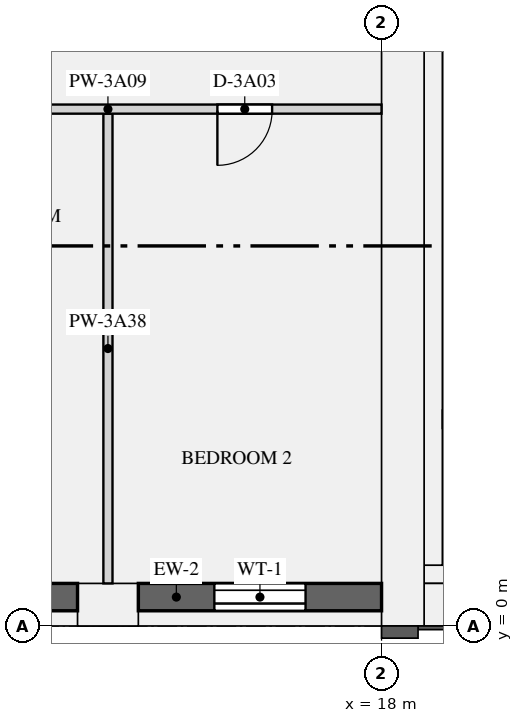
"""IFC4 building model, lengths in metres.
Left out: names, types, materials, properties, quantities, classifications, styles, units other than length and angle.
Written with IfcOpenShell. Run it as: python <this file> out.ifc"""

import sys

from ifc_helpers import new_model, si_unit, direction, frame, frame_2d, origin, origin_2d, place, context, subcontext, project, spatial, rectangle, extrude, element, fill, save


model = new_model("IFC4")
c1 = context("Model", 3, precision=1e-05, world=origin(), true_north=direction((0.0, 1.0)))
c2 = subcontext(c1, "Body", "Model", "MODEL_VIEW")
j1 = project(units=[si_unit("LENGTHUNIT", "METRE"), si_unit("PLANEANGLEUNIT", "RADIAN")], contexts=[c1])
p1 = place(None, origin())
s1 = spatial("IfcSite", under=j1, at=p1, CompositionType="ELEMENT")
p2 = place(p1, origin())
s2 = spatial("IfcBuilding", under=s1, at=p2, CompositionType="ELEMENT")
p3 = place(p2, frame((0.0, 0.0, 141.3)))
s3 = spatial("IfcBuildingStorey", under=s2, at=p3, CompositionType="ELEMENT", Elevation=141.3)
p4 = place(p3, frame((13.5, 0.35, 0.0), z_axis=(0.0, 0.0, 1.0), x_axis=(1.0, 0.0, 0.0)))
e1 = element("IfcColumn", 1, at=p4, inside=s3, PredefinedType="USERDEFINED", context=c2, shape_type="SweptSolid", body=[
    extrude(rectangle(XDim=1.0, YDim=0.7, at=origin_2d()), origin(), (0.0, 0.0, 1.0), 3.15),
])
p5 = place(p3, frame((18.35, 0.0, 0.0), z_axis=(0.0, 0.0, 1.0), x_axis=(0.0, 1.0, 0.0)))
e2 = element("IfcWall", 2, at=p5, inside=s3, PredefinedType="SHEAR", context=c2, shape_type="SweptSolid", body=[
    extrude(rectangle(XDim=12.5, YDim=0.7, at=frame_2d((6.25, 0.0))), origin(), (0.0, 0.0, 1.0), 3.15),
])
p6 = place(p3, frame((18.7, 0.35, 0.0), z_axis=(0.0, 0.0, 1.0), x_axis=(1.0, 0.0, 0.0)))
e3 = element("IfcWall", 3, at=p6, inside=s3, PredefinedType="SHEAR", context=c2, shape_type="SweptSolid", body=[
    extrude(rectangle(XDim=34.6, YDim=0.7, at=frame_2d((17.3, 0.0))), origin(), (0.0, 0.0, 1.0), 3.15),
])
p7 = place(p3, frame((18.85, 1.0, 0.0), z_axis=(0.0, 0.0, 1.0), x_axis=(0.0, 1.0, 0.0)))
e4 = element("IfcWall", 4, at=p7, inside=s3, PredefinedType="SHEAR", context=c2, shape_type="SweptSolid", body=[
    extrude(rectangle(XDim=10.9, YDim=0.3, at=frame_2d((5.45, 0.0))), origin(), (0.0, 0.0, 1.0), 3.15),
])
p8 = place(p3, frame((18.7, 0.85, 0.0), z_axis=(0.0, 0.0, 1.0), x_axis=(1.0, 0.0, 0.0)))
e5 = element("IfcWall", 5, at=p8, inside=s3, PredefinedType="SHEAR", context=c2, shape_type="SweptSolid", body=[
    extrude(rectangle(XDim=34.6, YDim=0.3, at=frame_2d((17.3, 0.0))), origin(), (0.0, 0.0, 1.0), 3.15),
])
p9 = place(p3, frame((19.0, 3.4, 0.0), z_axis=(0.0, 0.0, 1.0), x_axis=(1.0, 0.0, 0.0)))
e6 = element("IfcWall", 6, at=p9, inside=s3, PredefinedType="SHEAR", context=c2, shape_type="SweptSolid", body=[
    extrude(rectangle(XDim=2.55, YDim=0.3, at=frame_2d((1.275, 0.0))), origin(), (0.0, 0.0, 1.0), 3.15),
])
p10 = place(p9, frame((0.675, 0.0, 0.0)))
e7 = element("IfcOpeningElement", 7, at=p10, cuts=e6, PredefinedType="OPENING", context=c2, shape_type="SweptSolid", body=[
    extrude(rectangle(XDim=1.2, YDim=2.1, at=frame_2d((0.6, 1.05))), frame((0.0, 0.16, 0.0), z_axis=(0.0, -1.0, 0.0), x_axis=(1.0, 0.0, 0.0)), (0.0, 0.0, 1.0), 0.32),
])
p11 = place(p3, frame((10.0, 0.475, 0.9), z_axis=(0.0, 0.0, 1.0), x_axis=(1.0, 0.0, 0.0)))
e8 = element("IfcWall", 8, at=p11, inside=s3, PredefinedType="SOLIDWALL", context=c2, shape_type="SweptSolid", body=[
    extrude(rectangle(XDim=3.0, YDim=0.45, at=frame_2d((1.5, 0.0))), origin(), (0.0, 0.0, 1.0), 1.93),
])
p12 = place(p11, frame((0.75, 0.0, 0.15)))
e9 = element("IfcOpeningElement", 9, at=p12, cuts=e8, PredefinedType="OPENING", context=c2, shape_type="SweptSolid", body=[
    extrude(rectangle(XDim=1.5, YDim=1.5, at=frame_2d((0.75, 0.75))), frame((0.0, 0.235, 0.0), z_axis=(0.0, -1.0, 0.0), x_axis=(1.0, 0.0, 0.0)), (0.0, 0.0, 1.0), 0.47),
])
p13 = place(p3, frame((14.0, 0.475, 0.9), z_axis=(0.0, 0.0, 1.0), x_axis=(1.0, 0.0, 0.0)))
e10 = element("IfcWall", 10, at=p13, inside=s3, PredefinedType="SOLIDWALL", context=c2, shape_type="SweptSolid", body=[
    extrude(rectangle(XDim=4.0, YDim=0.45, at=frame_2d((2.0, 0.0))), origin(), (0.0, 0.0, 1.0), 1.93),
])
p14 = place(p13, frame((1.25, 0.0, 0.15)))
e11 = element("IfcOpeningElement", 11, at=p14, cuts=e10, PredefinedType="OPENING", context=c2, shape_type="SweptSolid", body=[
    extrude(rectangle(XDim=1.5, YDim=1.5, at=frame_2d((0.75, 0.75))), frame((0.0, 0.235, 0.0), z_axis=(0.0, -1.0, 0.0), x_axis=(1.0, 0.0, 0.0)), (0.0, 0.0, 1.0), 0.47),
])
p15 = place(p3, frame((5.2, 8.5, 0.0), z_axis=(0.0, 0.0, 1.0), x_axis=(1.0, 0.0, 0.0)))
e12 = element("IfcWall", 12, at=p15, inside=s3, PredefinedType="PARTITIONING", context=c2, shape_type="SweptSolid", body=[
    extrude(rectangle(XDim=12.8, YDim=0.15, at=frame_2d((6.4, 0.0))), origin(), (0.0, 0.0, 1.0), 2.83),
])
p16 = place(p15, frame((10.1, 0.0, 0.0)))
e13 = element("IfcOpeningElement", 13, at=p16, cuts=e12, PredefinedType="OPENING", context=c2, shape_type="SweptSolid", body=[
    extrude(rectangle(XDim=0.9, YDim=2.1, at=frame_2d((0.45, 1.05))), frame((0.0, 0.085, 0.0), z_axis=(0.0, -1.0, 0.0), x_axis=(1.0, 0.0, 0.0)), (0.0, 0.0, 1.0), 0.17),
])
p17 = place(p15, frame((5.6, 0.0, 0.0)))
e14 = element("IfcOpeningElement", 14, at=p17, cuts=e12, PredefinedType="OPENING", context=c2, shape_type="SweptSolid", body=[
    extrude(rectangle(XDim=0.9, YDim=2.1, at=frame_2d((0.45, 1.05))), frame((0.0, 0.085, 0.0), z_axis=(0.0, -1.0, 0.0), x_axis=(1.0, 0.0, 0.0)), (0.0, 0.0, 1.0), 0.17),
])
p18 = place(p15, frame((1.375, 0.0, 0.0)))
e15 = element("IfcOpeningElement", 15, at=p18, cuts=e12, PredefinedType="OPENING", context=c2, shape_type="SweptSolid", body=[
    extrude(rectangle(XDim=0.9, YDim=2.1, at=frame_2d((0.45, 1.05))), frame((0.0, 0.085, 0.0), z_axis=(0.0, -1.0, 0.0), x_axis=(1.0, 0.0, 0.0)), (0.0, 0.0, 1.0), 0.17),
])
p19 = place(p3, frame((13.5, 0.7, 0.0), z_axis=(0.0, 0.0, 1.0), x_axis=(0.0, 1.0, 0.0)))
e16 = element("IfcWall", 16, at=p19, inside=s3, PredefinedType="PARTITIONING", context=c2, shape_type="SweptSolid", body=[
    extrude(rectangle(XDim=7.725, YDim=0.15, at=frame_2d((3.863, 0.0))), origin(), (0.0, 0.0, 1.0), 2.83),
])
p20 = place(p14, origin())
e17 = element("IfcWindow", 17, at=p20, inside=s3, PartitioningType="SINGLE_PANEL", PredefinedType="WINDOW", context=c2, shape_type="SweptSolid", body=[
    extrude(rectangle(XDim=1.5, YDim=1.5, at=frame_2d((0.75, 0.75))), frame((0.0, -0.065, 0.0), z_axis=(0.0, -1.0, 0.0), x_axis=(1.0, 0.0, 0.0)), (0.0, 0.0, 1.0), 0.06),
])
fill(e11, e17)
p21 = place(p16, frame((0.9, 0.0, 0.0), z_axis=(0.0, 0.0, 1.0), x_axis=(-1.0, 0.0, 0.0)))
e18 = element("IfcDoor", 18, at=p21, inside=s3, OperationType="SINGLE_SWING_RIGHT", PredefinedType="DOOR", context=c2, shape_type="SweptSolid", body=[
    extrude(rectangle(XDim=0.9, YDim=2.1, at=frame_2d((0.45, 1.05))), frame((0.0, 0.025, 0.0), z_axis=(0.0, -1.0, 0.0), x_axis=(1.0, 0.0, 0.0)), (0.0, 0.0, 1.0), 0.05),
])
fill(e13, e18)
save(model, sys.argv[1])
